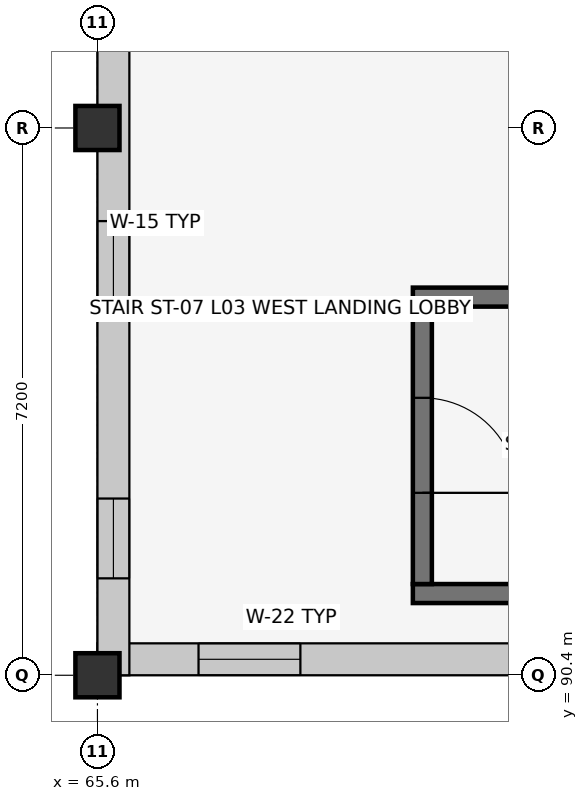
"""IFC4 building model, lengths in metres.
Left out: names, types, materials, properties, quantities, classifications, styles, units other than length and angle.
Written with IfcOpenShell. Run it as: python <this file> out.ifc"""

import sys

from ifc_helpers import new_model, si_unit, direction, frame, frame_2d, origin, origin_2d, place, context, subcontext, project, spatial, rectangle, extrude, element, fill, save


model = new_model("IFC4")
c1 = context("Model", 3, precision=1e-05, world=origin(), true_north=direction((0.0, 1.0)))
c2 = subcontext(c1, "Body", "Model", "MODEL_VIEW")
j1 = project(units=[si_unit("LENGTHUNIT", "METRE"), si_unit("PLANEANGLEUNIT", "RADIAN")], contexts=[c1])
p1 = place(None, origin())
s1 = spatial("IfcSite", under=j1, at=p1, CompositionType="ELEMENT")
p2 = place(p1, origin())
s2 = spatial("IfcBuilding", under=s1, at=p2, CompositionType="ELEMENT")
p3 = place(p2, frame((0.0, 0.0, 13.8)))
s3 = spatial("IfcBuildingStorey", under=s2, at=p3, CompositionType="ELEMENT", Elevation=13.8)
for number, where, z_axis, x_axis in (
    (1, (65.6, 90.4, 0.0), (0.0, 0.0, 1.0), (1.0, 0.0, 0.0)),
    (2, (65.6, 97.6, 0.0), (0.0, 0.0, 1.0), (1.0, 0.0, 0.0)),
):
    element("IfcColumn", number, at=place(p3, frame(where, z_axis=z_axis, x_axis=x_axis)), inside=s3, PredefinedType="COLUMN", context=c2, shape_type="SweptSolid", body=[
        extrude(rectangle(XDim=0.58, YDim=0.58, at=origin_2d()), origin(), (0.0, 0.0, 1.0), 4.2),
    ])
p4 = place(p3, frame((101.6, 90.61, 0.0), z_axis=(0.0, 0.0, 1.0), x_axis=(-1.0, 0.0, 0.0)))
e3 = element("IfcWall", 3, at=p4, inside=s3, PredefinedType="SOLIDWALL", context=c2, shape_type="SweptSolid", body=[
    extrude(rectangle(XDim=36.0, YDim=0.42, at=frame_2d((18.0, 0.0))), origin(), (0.0, 0.0, 1.0), 3.175),
])
p5 = place(p4, frame((1.475, 0.0, 0.9)))
e4 = element("IfcOpeningElement", 4, at=p5, cuts=e3, PredefinedType="OPENING", context=c2, shape_type="SweptSolid", body=[
    extrude(rectangle(XDim=1.05, YDim=1.6, at=frame_2d((0.525, 0.8))), frame((0.0, 0.222, 0.0), z_axis=(0.0, -1.0, 0.0), x_axis=(1.0, 0.0, 0.0)), (0.0, 0.0, 1.0), 0.444),
])
p6 = place(p4, frame((25.44, 0.0, 0.9)))
e5 = element("IfcOpeningElement", 5, at=p6, cuts=e3, PredefinedType="OPENING", context=c2, shape_type="SweptSolid", body=[
    extrude(rectangle(XDim=1.12, YDim=1.75, at=frame_2d((0.56, 0.875))), frame((0.0, 0.222, 0.0), z_axis=(0.0, -1.0, 0.0), x_axis=(1.0, 0.0, 0.0)), (0.0, 0.0, 1.0), 0.444),
])
p7 = place(p4, frame((33.33, 0.0, 0.9)))
e6 = element("IfcOpeningElement", 6, at=p7, cuts=e3, PredefinedType="OPENING", context=c2, shape_type="SweptSolid", body=[
    extrude(rectangle(XDim=1.34, YDim=1.75, at=frame_2d((0.67, 0.875))), frame((0.0, 0.222, 0.0), z_axis=(0.0, -1.0, 0.0), x_axis=(1.0, 0.0, 0.0)), (0.0, 0.0, 1.0), 0.444),
])
p8 = place(p3, frame((65.81, 90.4, 0.0), z_axis=(0.0, 0.0, 1.0), x_axis=(0.0, 1.0, 0.0)))
e7 = element("IfcWall", 7, at=p8, inside=s3, PredefinedType="SOLIDWALL", context=c2, shape_type="SweptSolid", body=[
    extrude(rectangle(XDim=21.6, YDim=0.42, at=frame_2d((10.8, 0.0))), origin(), (0.0, 0.0, 1.0), 3.135),
])
p9 = place(p8, frame((1.275, 0.0, 0.9)))
e8 = element("IfcOpeningElement", 8, at=p9, cuts=e7, PredefinedType="OPENING", context=c2, shape_type="SweptSolid", body=[
    extrude(rectangle(XDim=1.05, YDim=1.6, at=frame_2d((0.525, 0.8))), frame((0.0, 0.222, 0.0), z_axis=(0.0, -1.0, 0.0), x_axis=(1.0, 0.0, 0.0)), (0.0, 0.0, 1.0), 0.444),
])
p10 = place(p8, frame((4.825, 0.0, 0.9)))
e9 = element("IfcOpeningElement", 9, at=p10, cuts=e7, PredefinedType="OPENING", context=c2, shape_type="SweptSolid", body=[
    extrude(rectangle(XDim=1.15, YDim=1.6, at=frame_2d((0.575, 0.8))), frame((0.0, 0.222, 0.0), z_axis=(0.0, -1.0, 0.0), x_axis=(1.0, 0.0, 0.0)), (0.0, 0.0, 1.0), 0.444),
])
p11 = place(p8, frame((8.375, 0.0, 0.9)))
e10 = element("IfcOpeningElement", 10, at=p11, cuts=e7, PredefinedType="OPENING", context=c2, shape_type="SweptSolid", body=[
    extrude(rectangle(XDim=1.25, YDim=1.6, at=frame_2d((0.625, 0.8))), frame((0.0, 0.222, 0.0), z_axis=(0.0, -1.0, 0.0), x_axis=(1.0, 0.0, 0.0)), (0.0, 0.0, 1.0), 0.444),
])
p12 = place(p8, frame((11.91, 0.0, 0.9)))
e11 = element("IfcOpeningElement", 11, at=p12, cuts=e7, PredefinedType="OPENING", context=c2, shape_type="SweptSolid", body=[
    extrude(rectangle(XDim=1.38, YDim=1.6, at=frame_2d((0.69, 0.8))), frame((0.0, 0.222, 0.0), z_axis=(0.0, -1.0, 0.0), x_axis=(1.0, 0.0, 0.0)), (0.0, 0.0, 1.0), 0.444),
])
p13 = place(p8, frame((15.45, 0.0, 0.9)))
e12 = element("IfcOpeningElement", 12, at=p13, cuts=e7, PredefinedType="OPENING", context=c2, shape_type="SweptSolid", body=[
    extrude(rectangle(XDim=1.5, YDim=1.6, at=frame_2d((0.75, 0.8))), frame((0.0, 0.222, 0.0), z_axis=(0.0, -1.0, 0.0), x_axis=(1.0, 0.0, 0.0)), (0.0, 0.0, 1.0), 0.444),
])
p14 = place(p8, frame((19.3, 0.0, 0.9)))
e13 = element("IfcOpeningElement", 13, at=p14, cuts=e7, PredefinedType="OPENING", context=c2, shape_type="SweptSolid", body=[
    extrude(rectangle(XDim=1.0, YDim=1.75, at=frame_2d((0.5, 0.875))), frame((0.0, 0.222, 0.0), z_axis=(0.0, -1.0, 0.0), x_axis=(1.0, 0.0, 0.0)), (0.0, 0.0, 1.0), 0.444),
])
p15 = place(p3, frame((69.75, 91.475, 0.0), z_axis=(0.0, 0.0, 1.0), x_axis=(1.0, 0.0, 0.0)))
e14 = element("IfcWall", 14, at=p15, inside=s3, PredefinedType="SHEAR", context=c2, shape_type="SweptSolid", body=[
    extrude(rectangle(XDim=9.57, YDim=0.25, at=frame_2d((4.785, 0.0))), origin(), (0.0, 0.0, 1.0), 3.88),
])
p16 = place(p3, frame((78.75, 95.375, 0.0), z_axis=(0.0, 0.0, 1.0), x_axis=(-1.0, 0.0, 0.0)))
e15 = element("IfcWall", 15, at=p16, inside=s3, PredefinedType="SHEAR", context=c2, shape_type="SweptSolid", body=[
    extrude(rectangle(XDim=9.0, YDim=0.25, at=frame_2d((4.5, 0.0))), origin(), (0.0, 0.0, 1.0), 3.88),
])
p17 = place(p3, frame((69.875, 95.25, 0.0), z_axis=(0.0, 0.0, 1.0), x_axis=(0.0, -1.0, 0.0)))
e16 = element("IfcWall", 16, at=p17, inside=s3, PredefinedType="SHEAR", context=c2, shape_type="SweptSolid", body=[
    extrude(rectangle(XDim=3.65, YDim=0.25, at=frame_2d((1.825, 0.0))), origin(), (0.0, 0.0, 1.0), 3.88),
])
p18 = place(p17, frame((1.2, 0.0, 0.0)))
e17 = element("IfcOpeningElement", 17, at=p18, cuts=e16, PredefinedType="OPENING", context=c2, shape_type="SweptSolid", body=[
    extrude(rectangle(XDim=1.25, YDim=2.15, at=frame_2d((0.625, 1.075))), frame((0.0, 0.137, 0.0), z_axis=(0.0, -1.0, 0.0), x_axis=(1.0, 0.0, 0.0)), (0.0, 0.0, 1.0), 0.274),
])
p19 = place(p7, origin())
e18 = element("IfcWindow", 18, at=p19, inside=s3, PartitioningType="SINGLE_PANEL", PredefinedType="WINDOW", context=c2, shape_type="SweptSolid", body=[
    extrude(rectangle(XDim=1.34, YDim=1.75, at=frame_2d((0.67, 0.875))), frame((0.0, 0.03, 0.0), z_axis=(0.0, -1.0, 0.0), x_axis=(1.0, 0.0, 0.0)), (0.0, 0.0, 1.0), 0.06),
])
fill(e6, e18)
p20 = place(p9, origin())
e19 = element("IfcWindow", 19, at=p20, inside=s3, PartitioningType="SINGLE_PANEL", PredefinedType="WINDOW", context=c2, shape_type="SweptSolid", body=[
    extrude(rectangle(XDim=1.05, YDim=1.6, at=frame_2d((0.525, 0.8))), frame((0.0, 0.03, 0.0), z_axis=(0.0, -1.0, 0.0), x_axis=(1.0, 0.0, 0.0)), (0.0, 0.0, 1.0), 0.06),
])
fill(e8, e19)
p21 = place(p10, origin())
e20 = element("IfcWindow", 20, at=p21, inside=s3, PartitioningType="SINGLE_PANEL", PredefinedType="WINDOW", context=c2, shape_type="SweptSolid", body=[
    extrude(rectangle(XDim=1.15, YDim=1.6, at=frame_2d((0.575, 0.8))), frame((0.0, 0.03, 0.0), z_axis=(0.0, -1.0, 0.0), x_axis=(1.0, 0.0, 0.0)), (0.0, 0.0, 1.0), 0.06),
])
fill(e9, e20)
p22 = place(p18, origin())
e21 = element("IfcDoor", 21, at=p22, inside=s3, OperationType="SINGLE_SWING_RIGHT", PredefinedType="DOOR", context=c2, shape_type="SweptSolid", body=[
    extrude(rectangle(XDim=1.25, YDim=2.15, at=frame_2d((0.625, 1.075))), frame((0.0, 0.025, 0.0), z_axis=(0.0, -1.0, 0.0), x_axis=(1.0, 0.0, 0.0)), (0.0, 0.0, 1.0), 0.05),
])
fill(e17, e21)
save(model, sys.argv[1])
